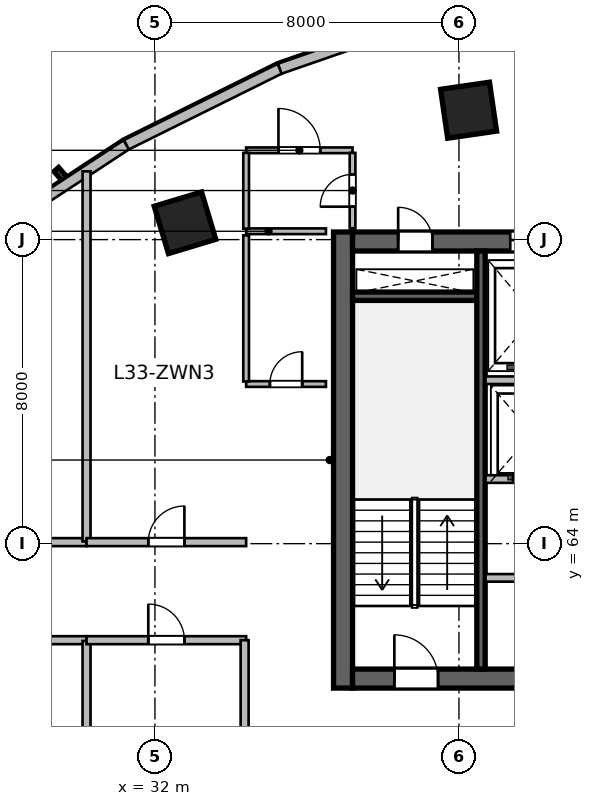
"""IFC4 building model, lengths in metres.
Left out: names, types, materials, properties, quantities, classifications, styles, units other than length and angle.
Written with IfcOpenShell. Run it as: python <this file> out.ifc"""

import sys

from ifc_helpers import new_model, si_unit, direction, frame, frame_2d, origin, origin_2d, place, context, subcontext, project, spatial, rectangle, extrude, source, transform, mapped, element, fill, save


model = new_model("IFC4")
c1 = context("Model", 3, precision=1e-05, world=origin(), true_north=direction((0.0, 1.0)))
c2 = subcontext(c1, "Body", "Model", "MODEL_VIEW")
j1 = project(units=[si_unit("LENGTHUNIT", "METRE"), si_unit("PLANEANGLEUNIT", "RADIAN")], contexts=[c1])
p1 = place(None, origin())
s1 = spatial("IfcSite", under=j1, at=p1, CompositionType="ELEMENT")
p2 = place(p1, origin())
s2 = spatial("IfcBuilding", under=s1, at=p2, CompositionType="ELEMENT")
p3 = place(p2, frame((0.0, 0.0, 138.9)))
s3 = spatial("IfcBuildingStorey", under=s2, at=p3, CompositionType="ELEMENT", Elevation=138.9)
m1 = source(origin(), c2, "Body", "SweptSolid", [
    extrude(rectangle(XDim=12.0, YDim=0.5, at=frame_2d((6.0, 0.0))), origin(), (0.0, 0.0, 1.0), 3.9),
])
p4 = place(p3, frame((36.95, 60.2, 0.0), z_axis=(0.0, 0.0, 1.0), x_axis=(0.0, 1.0, 0.0)))
e1 = element("IfcWall", 1, at=p4, inside=s3, PredefinedType="SHEAR", context=c2, shape_type="MappedRepresentation", body=[
    mapped(m1, transform((0.0, 0.0, 0.0), scale=1.0)),
])
m2 = source(origin(), c2, "Body", "SweptSolid", [
    extrude(rectangle(XDim=21.6, YDim=0.5, at=frame_2d((10.8, 0.0))), origin(), (0.0, 0.0, 1.0), 3.9),
])
p5 = place(p3, frame((37.2, 60.45, 0.0), z_axis=(0.0, 0.0, 1.0), x_axis=(1.0, 0.0, 0.0)))
e2 = element("IfcWall", 2, at=p5, inside=s3, PredefinedType="SHEAR", context=c2, shape_type="MappedRepresentation", body=[
    mapped(m2, transform((0.0, 0.0, 0.0), scale=1.0)),
])
p6 = place(p5, frame((1.1, 0.0, 0.0)))
e3 = element("IfcOpeningElement", 3, at=p6, cuts=e2, PredefinedType="OPENING", context=c2, shape_type="SweptSolid", body=[
    extrude(rectangle(XDim=1.15, YDim=2.15, at=frame_2d((0.575, 1.075))), frame((0.0, 0.26, 0.0), z_axis=(0.0, -1.0, 0.0), x_axis=(1.0, 0.0, 0.0)), (0.0, 0.0, 1.0), 0.52),
])
p7 = place(p5, frame((19.5, 0.0, 0.0)))
e4 = element("IfcOpeningElement", 4, at=p7, cuts=e2, PredefinedType="OPENING", context=c2, shape_type="SweptSolid", body=[
    extrude(rectangle(XDim=0.9, YDim=2.1, at=frame_2d((0.45, 1.05))), frame((0.0, 0.26, 0.0), z_axis=(0.0, -1.0, 0.0), x_axis=(1.0, 0.0, 0.0)), (0.0, 0.0, 1.0), 0.52),
])
p8 = place(p5, frame((12.02, 0.0, 0.0)))
e5 = element("IfcOpeningElement", 5, at=p8, cuts=e2, PredefinedType="OPENING", context=c2, shape_type="SweptSolid", body=[
    extrude(rectangle(XDim=1.6, YDim=2.15, at=frame_2d((0.8, 1.075))), frame((0.0, 0.26, 0.0), z_axis=(0.0, -1.0, 0.0), x_axis=(1.0, 0.0, 0.0)), (0.0, 0.0, 1.0), 0.52),
])
p9 = place(p3, frame((37.2, 71.95, 0.0), z_axis=(0.0, 0.0, 1.0), x_axis=(1.0, 0.0, 0.0)))
e6 = element("IfcWall", 6, at=p9, inside=s3, PredefinedType="SHEAR", context=c2, shape_type="MappedRepresentation", body=[
    mapped(m2, transform((0.0, 0.0, 0.0), scale=1.0)),
])
p10 = place(p9, frame((1.2, 0.0, 0.0)))
e7 = element("IfcOpeningElement", 7, at=p10, cuts=e6, PredefinedType="OPENING", context=c2, shape_type="SweptSolid", body=[
    extrude(rectangle(XDim=0.9, YDim=2.1, at=frame_2d((0.45, 1.05))), frame((0.0, 0.26, 0.0), z_axis=(0.0, -1.0, 0.0), x_axis=(1.0, 0.0, 0.0)), (0.0, 0.0, 1.0), 0.52),
])
p11 = place(p9, frame((14.7, 0.0, 0.0)))
e8 = element("IfcOpeningElement", 8, at=p11, cuts=e6, PredefinedType="OPENING", context=c2, shape_type="SweptSolid", body=[
    extrude(rectangle(XDim=1.2, YDim=2.15, at=frame_2d((0.6, 1.075))), frame((0.0, 0.26, 0.0), z_axis=(0.0, -1.0, 0.0), x_axis=(1.0, 0.0, 0.0)), (0.0, 0.0, 1.0), 0.52),
])
p12 = place(p9, frame((4.15, 0.0, 0.0)))
e9 = element("IfcOpeningElement", 9, at=p12, cuts=e6, PredefinedType="OPENING", context=c2, shape_type="SweptSolid", body=[
    extrude(rectangle(XDim=1.3, YDim=2.15, at=frame_2d((0.65, 1.075))), frame((0.0, 0.26, 0.0), z_axis=(0.0, -1.0, 0.0), x_axis=(1.0, 0.0, 0.0)), (0.0, 0.0, 1.0), 0.52),
])
p13 = place(p9, frame((7.25, 0.0, 0.0)))
e10 = element("IfcOpeningElement", 10, at=p13, cuts=e6, PredefinedType="OPENING", context=c2, shape_type="SweptSolid", body=[
    extrude(rectangle(XDim=0.9, YDim=2.1, at=frame_2d((0.45, 1.05))), frame((0.0, 0.26, 0.0), z_axis=(0.0, -1.0, 0.0), x_axis=(1.0, 0.0, 0.0)), (0.0, 0.0, 1.0), 0.52),
])
p14 = place(p9, frame((10.95, 0.0, 0.0)))
e11 = element("IfcOpeningElement", 11, at=p14, cuts=e6, PredefinedType="OPENING", context=c2, shape_type="SweptSolid", body=[
    extrude(rectangle(XDim=0.9, YDim=2.1, at=frame_2d((0.45, 1.05))), frame((0.0, 0.26, 0.0), z_axis=(0.0, -1.0, 0.0), x_axis=(1.0, 0.0, 0.0)), (0.0, 0.0, 1.0), 0.52),
])
m3 = source(origin(), c2, "Body", "SweptSolid", [
    extrude(rectangle(XDim=3.27, YDim=0.22, at=frame_2d((1.635, 0.0))), origin(), (0.0, 0.0, 1.0), 3.9),
])
p15 = place(p3, frame((37.2, 70.51, 0.0), z_axis=(0.0, 0.0, 1.0), x_axis=(1.0, 0.0, 0.0)))
e12 = element("IfcWall", 12, at=p15, inside=s3, PredefinedType="SHEAR", context=c2, shape_type="MappedRepresentation", body=[
    mapped(m3, transform((0.0, 0.0, 0.0), scale=1.0)),
])
m4 = source(origin(), c2, "Body", "SweptSolid", [
    extrude(rectangle(XDim=11.0, YDim=0.22, at=frame_2d((5.5, 0.0))), origin(), (0.0, 0.0, 1.0), 3.9),
])
p16 = place(p3, frame((40.58, 60.7, 0.0), z_axis=(0.0, 0.0, 1.0), x_axis=(0.0, 1.0, 0.0)))
e13 = element("IfcWall", 13, at=p16, inside=s3, PredefinedType="SHEAR", context=c2, shape_type="MappedRepresentation", body=[
    mapped(m4, transform((0.0, 0.0, 0.0), scale=1.0)),
])
m5 = source(origin(), c2, "Body", "SweptSolid", [
    extrude(rectangle(XDim=1.3, YDim=1.3, at=origin_2d()), origin(), (0.0, 0.0, 1.0), 3.9),
])
for number, where, z_axis, x_axis in (
    (14, (32.791, 72.442, 0.0), (0.0, 0.0, 1.0), (-0.289, 0.957, 0.0)),
    (15, (40.253, 75.404, 0.0), (0.0, 0.0, 1.0), (-0.143, 0.99, 0.0)),
):
    element("IfcColumn", number, at=place(p3, frame(where, z_axis=z_axis, x_axis=x_axis)), inside=s3, PredefinedType="COLUMN", context=c2, shape_type="MappedRepresentation", body=[
        mapped(m5, transform((0.0, 0.0, 0.0), scale=1.0)),
    ])
m6 = source(origin(), c2, "Body", "SweptSolid", [
    extrude(rectangle(XDim=4.626, YDim=0.28, at=frame_2d((2.313, 0.0))), origin(), (0.0, 0.0, 1.0), 3.65),
])
p17 = place(p3, frame((27.382, 71.958, 0.0), z_axis=(0.0, 0.0, 1.0), x_axis=(0.83595938331, 0.548791316855, 0.0)))
e16 = element("IfcWall", 16, at=p17, inside=s3, PredefinedType="SOLIDWALL", context=c2, shape_type="MappedRepresentation", body=[
    mapped(m6, transform((0.0, 0.0, 0.0), scale=1.0)),
])
m7 = source(origin(), c2, "Body", "SweptSolid", [
    extrude(rectangle(XDim=4.506, YDim=0.28, at=frame_2d((2.253, 0.0))), origin(), (0.0, 0.0, 1.0), 3.65),
])
p18 = place(p3, frame((31.249, 74.496, 0.0), z_axis=(0.0, 0.0, 1.0), x_axis=(0.89597155075, 0.444111450254, 0.0)))
e17 = element("IfcWall", 17, at=p18, inside=s3, PredefinedType="SOLIDWALL", context=c2, shape_type="MappedRepresentation", body=[
    mapped(m7, transform((0.0, 0.0, 0.0), scale=1.0)),
])
m8 = source(origin(), c2, "Body", "SweptSolid", [
    extrude(rectangle(XDim=4.409, YDim=0.28, at=frame_2d((2.205, 0.0))), origin(), (0.0, 0.0, 1.0), 3.65),
])
p19 = place(p3, frame((35.286, 76.497, 0.0), z_axis=(0.0, 0.0, 1.0), x_axis=(0.944879374121, 0.327418643881, 0.0)))
e18 = element("IfcWall", 18, at=p19, inside=s3, PredefinedType="SOLIDWALL", context=c2, shape_type="MappedRepresentation", body=[
    mapped(m8, transform((0.0, 0.0, 0.0), scale=1.0)),
])
m9 = source(origin(), c2, "Body", "SweptSolid", [
    extrude(rectangle(XDim=8.8, YDim=0.2, at=frame_2d((4.4, 0.0))), origin(), (0.0, 0.0, 1.0), 3.65),
])
p20 = place(p3, frame((40.7, 68.3, 0.0), z_axis=(0.0, 0.0, 1.0), x_axis=(1.0, 0.0, 0.0)))
e19 = element("IfcWall", 19, at=p20, inside=s3, PredefinedType="SOLIDWALL", context=c2, shape_type="MappedRepresentation", body=[
    mapped(m9, transform((0.0, 0.0, 0.0), scale=1.0)),
])
m10 = source(origin(), c2, "Body", "SweptSolid", [
    extrude(rectangle(XDim=8.02, YDim=0.2, at=frame_2d((4.01, 0.0))), origin(), (0.0, 0.0, 1.0), 3.65),
])
p21 = place(p3, frame((40.7, 63.1, 0.0), z_axis=(0.0, 0.0, 1.0), x_axis=(1.0, 0.0, 0.0)))
e20 = element("IfcWall", 20, at=p21, inside=s3, PredefinedType="SOLIDWALL", context=c2, shape_type="MappedRepresentation", body=[
    mapped(m10, transform((0.0, 0.0, 0.0), scale=1.0)),
])
p22 = place(p21, frame((1.05, 0.0, 0.0)))
e21 = element("IfcOpeningElement", 21, at=p22, cuts=e20, PredefinedType="OPENING", context=c2, shape_type="SweptSolid", body=[
    extrude(rectangle(XDim=0.9, YDim=2.1, at=frame_2d((0.45, 1.05))), frame((0.0, 0.11, 0.0), z_axis=(0.0, -1.0, 0.0), x_axis=(1.0, 0.0, 0.0)), (0.0, 0.0, 1.0), 0.22),
])
p23 = place(p21, frame((4.99, 0.0, 0.0)))
e22 = element("IfcOpeningElement", 22, at=p23, cuts=e20, PredefinedType="OPENING", context=c2, shape_type="SweptSolid", body=[
    extrude(rectangle(XDim=0.9, YDim=2.1, at=frame_2d((0.45, 1.05))), frame((0.0, 0.11, 0.0), z_axis=(0.0, -1.0, 0.0), x_axis=(1.0, 0.0, 0.0)), (0.0, 0.0, 1.0), 0.22),
])
p24 = place(p3, frame((40.7, 65.7, 0.0), z_axis=(0.0, 0.0, 1.0), x_axis=(1.0, 0.0, 0.0)))
e23 = element("IfcWall", 23, at=p24, inside=s3, PredefinedType="SOLIDWALL", context=c2, shape_type="MappedRepresentation", body=[
    mapped(m9, transform((0.0, 0.0, 0.0), scale=1.0)),
])
p25 = place(p24, frame((0.72, 0.0, 0.0)))
e24 = element("IfcOpeningElement", 24, at=p25, cuts=e23, PredefinedType="OPENING", context=c2, shape_type="SweptSolid", body=[
    extrude(rectangle(XDim=1.0, YDim=2.15, at=frame_2d((0.5, 1.075))), frame((0.0, 0.11, 0.0), z_axis=(0.0, -1.0, 0.0), x_axis=(1.0, 0.0, 0.0)), (0.0, 0.0, 1.0), 0.22),
])
p26 = place(p24, frame((2.62, 0.0, 0.0)))
e25 = element("IfcOpeningElement", 25, at=p26, cuts=e23, PredefinedType="OPENING", context=c2, shape_type="SweptSolid", body=[
    extrude(rectangle(XDim=1.0, YDim=2.15, at=frame_2d((0.5, 1.075))), frame((0.0, 0.11, 0.0), z_axis=(0.0, -1.0, 0.0), x_axis=(1.0, 0.0, 0.0)), (0.0, 0.0, 1.0), 0.22),
])
p27 = place(p24, frame((4.55, 0.0, 0.0)))
e26 = element("IfcOpeningElement", 26, at=p27, cuts=e23, PredefinedType="OPENING", context=c2, shape_type="SweptSolid", body=[
    extrude(rectangle(XDim=1.0, YDim=2.15, at=frame_2d((0.5, 1.075))), frame((0.0, 0.11, 0.0), z_axis=(0.0, -1.0, 0.0), x_axis=(1.0, 0.0, 0.0)), (0.0, 0.0, 1.0), 0.22),
])
p28 = place(p24, frame((6.55, 0.0, 0.0)))
e27 = element("IfcOpeningElement", 27, at=p28, cuts=e23, PredefinedType="OPENING", context=c2, shape_type="SweptSolid", body=[
    extrude(rectangle(XDim=1.0, YDim=2.15, at=frame_2d((0.5, 1.075))), frame((0.0, 0.11, 0.0), z_axis=(0.0, -1.0, 0.0), x_axis=(1.0, 0.0, 0.0)), (0.0, 0.0, 1.0), 0.22),
])
m11 = source(origin(), c2, "Body", "SweptSolid", [
    extrude(rectangle(XDim=2.1, YDim=0.15, at=frame_2d((1.05, 0.0))), origin(), (0.0, 0.0, 1.0), 3.65),
])
p29 = place(p3, frame((34.4, 72.22, 0.0), z_axis=(0.0, 0.0, 1.0), x_axis=(1.0, 0.0, 0.0)))
e28 = element("IfcWall", 28, at=p29, inside=s3, PredefinedType="PARTITIONING", context=c2, shape_type="MappedRepresentation", body=[
    mapped(m11, transform((0.0, 0.0, 0.0), scale=1.0)),
])
m12 = source(origin(), c2, "Body", "SweptSolid", [
    extrude(rectangle(XDim=2.8, YDim=0.15, at=frame_2d((1.4, 0.0))), origin(), (0.0, 0.0, 1.0), 3.65),
])
p30 = place(p3, frame((34.4, 74.35, 0.0), z_axis=(0.0, 0.0, 1.0), x_axis=(1.0, 0.0, 0.0)))
e29 = element("IfcWall", 29, at=p30, inside=s3, PredefinedType="PARTITIONING", context=c2, shape_type="MappedRepresentation", body=[
    mapped(m12, transform((0.0, 0.0, 0.0), scale=1.0)),
])
p31 = place(p30, frame((0.85, 0.0, 0.0)))
e30 = element("IfcOpeningElement", 30, at=p31, cuts=e29, PredefinedType="OPENING", context=c2, shape_type="SweptSolid", body=[
    extrude(rectangle(XDim=1.1, YDim=2.15, at=frame_2d((0.55, 1.075))), frame((0.0, 0.085, 0.0), z_axis=(0.0, -1.0, 0.0), x_axis=(1.0, 0.0, 0.0)), (0.0, 0.0, 1.0), 0.17),
])
m13 = source(origin(), c2, "Body", "SweptSolid", [
    extrude(rectangle(XDim=1.995, YDim=0.15, at=frame_2d((0.998, 0.0))), origin(), (0.0, 0.0, 1.0), 3.65),
])
p32 = place(p3, frame((34.4, 72.288, 0.0), z_axis=(0.0, 0.0, 1.0), x_axis=(0.0, 1.0, 0.0)))
e31 = element("IfcWall", 31, at=p32, inside=s3, PredefinedType="PARTITIONING", context=c2, shape_type="MappedRepresentation", body=[
    mapped(m13, transform((0.0, 0.0, 0.0), scale=1.0)),
])
m14 = source(origin(), c2, "Body", "SweptSolid", [
    extrude(rectangle(XDim=1.982, YDim=0.15, at=frame_2d((0.991, 0.0))), origin(), (0.0, 0.0, 1.0), 3.65),
])
p33 = place(p3, frame((37.2, 72.3, 0.0), z_axis=(0.0, 0.0, 1.0), x_axis=(0.0, 1.0, 0.0)))
e32 = element("IfcWall", 32, at=p33, inside=s3, PredefinedType="PARTITIONING", context=c2, shape_type="MappedRepresentation", body=[
    mapped(m14, transform((0.0, 0.0, 0.0), scale=1.0)),
])
p34 = place(p33, frame((0.566, 0.0, 0.0)))
e33 = element("IfcOpeningElement", 33, at=p34, cuts=e32, PredefinedType="OPENING", context=c2, shape_type="SweptSolid", body=[
    extrude(rectangle(XDim=0.85, YDim=2.1, at=frame_2d((0.425, 1.05))), frame((0.0, 0.085, 0.0), z_axis=(0.0, -1.0, 0.0), x_axis=(1.0, 0.0, 0.0)), (0.0, 0.0, 1.0), 0.17),
])
p35 = place(p3, frame((34.4, 68.2, 0.0), z_axis=(0.0, 0.0, 1.0), x_axis=(1.0, 0.0, 0.0)))
e34 = element("IfcWall", 34, at=p35, inside=s3, PredefinedType="PARTITIONING", context=c2, shape_type="MappedRepresentation", body=[
    mapped(m11, transform((0.0, 0.0, 0.0), scale=1.0)),
])
p36 = place(p35, frame((0.625, 0.0, 0.0)))
e35 = element("IfcOpeningElement", 35, at=p36, cuts=e34, PredefinedType="OPENING", context=c2, shape_type="SweptSolid", body=[
    extrude(rectangle(XDim=0.85, YDim=2.1, at=frame_2d((0.425, 1.05))), frame((0.0, 0.085, 0.0), z_axis=(0.0, -1.0, 0.0), x_axis=(1.0, 0.0, 0.0)), (0.0, 0.0, 1.0), 0.17),
])
m15 = source(origin(), c2, "Body", "SweptSolid", [
    extrude(rectangle(XDim=3.845, YDim=0.15, at=frame_2d((1.922, 0.0))), origin(), (0.0, 0.0, 1.0), 3.65),
])
p37 = place(p3, frame((34.4, 68.268, 0.0), z_axis=(0.0, 0.0, 1.0), x_axis=(0.0, 1.0, 0.0)))
e36 = element("IfcWall", 36, at=p37, inside=s3, PredefinedType="PARTITIONING", context=c2, shape_type="MappedRepresentation", body=[
    mapped(m15, transform((0.0, 0.0, 0.0), scale=1.0)),
])
m16 = source(origin(), c2, "Body", "SweptSolid", [
    extrude(rectangle(XDim=4.0, YDim=0.21, at=frame_2d((2.0, 0.0))), origin(), (0.0, 0.0, 1.0), 3.65),
])
p38 = place(p3, frame((26.2, 64.04, 0.0), z_axis=(0.0, 0.0, 1.0), x_axis=(1.0, 0.0, 0.0)))
e37 = element("IfcWall", 37, at=p38, inside=s3, PredefinedType="PARTITIONING", context=c2, shape_type="MappedRepresentation", body=[
    mapped(m16, transform((0.0, 0.0, 0.0), scale=1.0)),
])
p39 = place(p38, frame((1.525, 0.0, 0.0)))
e38 = element("IfcOpeningElement", 38, at=p39, cuts=e37, PredefinedType="OPENING", context=c2, shape_type="SweptSolid", body=[
    extrude(rectangle(XDim=0.95, YDim=2.1, at=frame_2d((0.475, 1.05))), frame((0.0, 0.115, 0.0), z_axis=(0.0, -1.0, 0.0), x_axis=(1.0, 0.0, 0.0)), (0.0, 0.0, 1.0), 0.23),
])
m17 = source(origin(), c2, "Body", "SweptSolid", [
    extrude(rectangle(XDim=9.736, YDim=0.21, at=frame_2d((4.868, 0.0))), origin(), (0.0, 0.0, 1.0), 3.65),
])
p40 = place(p3, frame((30.2, 64.06, 0.0), z_axis=(0.0, 0.0, 1.0), x_axis=(0.0, 1.0, 0.0)))
e39 = element("IfcWall", 39, at=p40, inside=s3, PredefinedType="PARTITIONING", context=c2, shape_type="MappedRepresentation", body=[
    mapped(m17, transform((0.0, 0.0, 0.0), scale=1.0)),
])
m18 = source(origin(), c2, "Body", "SweptSolid", [
    extrude(rectangle(XDim=4.2, YDim=0.21, at=frame_2d((2.1, 0.0))), origin(), (0.0, 0.0, 1.0), 3.65),
])
p41 = place(p3, frame((30.2, 64.04, 0.0), z_axis=(0.0, 0.0, 1.0), x_axis=(1.0, 0.0, 0.0)))
e40 = element("IfcWall", 40, at=p41, inside=s3, PredefinedType="PARTITIONING", context=c2, shape_type="MappedRepresentation", body=[
    mapped(m18, transform((0.0, 0.0, 0.0), scale=1.0)),
])
p42 = place(p41, frame((1.625, 0.0, 0.0)))
e41 = element("IfcOpeningElement", 41, at=p42, cuts=e40, PredefinedType="OPENING", context=c2, shape_type="SweptSolid", body=[
    extrude(rectangle(XDim=0.95, YDim=2.1, at=frame_2d((0.475, 1.05))), frame((0.0, 0.115, 0.0), z_axis=(0.0, -1.0, 0.0), x_axis=(1.0, 0.0, 0.0)), (0.0, 0.0, 1.0), 0.23),
])
p43 = place(p3, frame((26.2, 61.46, 0.0), z_axis=(0.0, 0.0, 1.0), x_axis=(1.0, 0.0, 0.0)))
e42 = element("IfcWall", 42, at=p43, inside=s3, PredefinedType="PARTITIONING", context=c2, shape_type="MappedRepresentation", body=[
    mapped(m16, transform((0.0, 0.0, 0.0), scale=1.0)),
])
p44 = place(p43, frame((1.525, 0.0, 0.0)))
e43 = element("IfcOpeningElement", 43, at=p44, cuts=e42, PredefinedType="OPENING", context=c2, shape_type="SweptSolid", body=[
    extrude(rectangle(XDim=0.95, YDim=2.1, at=frame_2d((0.475, 1.05))), frame((0.0, 0.115, 0.0), z_axis=(0.0, -1.0, 0.0), x_axis=(1.0, 0.0, 0.0)), (0.0, 0.0, 1.0), 0.23),
])
m19 = source(origin(), c2, "Body", "SweptSolid", [
    extrude(rectangle(XDim=19.103, YDim=0.21, at=frame_2d((9.552, 0.0))), origin(), (0.0, 0.0, 1.0), 2.942),
])
p45 = place(p3, frame((30.2, 42.337, 0.0), z_axis=(0.0, 0.0, 1.0), x_axis=(0.0, 1.0, 0.0)))
e44 = element("IfcWall", 44, at=p45, inside=s3, PredefinedType="PARTITIONING", context=c2, shape_type="MappedRepresentation", body=[
    mapped(m19, transform((0.0, 0.0, 0.0), scale=1.0)),
])
p46 = place(p3, frame((30.2, 61.46, 0.0), z_axis=(0.0, 0.0, 1.0), x_axis=(1.0, 0.0, 0.0)))
e45 = element("IfcWall", 45, at=p46, inside=s3, PredefinedType="PARTITIONING", context=c2, shape_type="MappedRepresentation", body=[
    mapped(m18, transform((0.0, 0.0, 0.0), scale=1.0)),
])
p47 = place(p46, frame((1.625, 0.0, 0.0)))
e46 = element("IfcOpeningElement", 46, at=p47, cuts=e45, PredefinedType="OPENING", context=c2, shape_type="SweptSolid", body=[
    extrude(rectangle(XDim=0.95, YDim=2.1, at=frame_2d((0.475, 1.05))), frame((0.0, 0.115, 0.0), z_axis=(0.0, -1.0, 0.0), x_axis=(1.0, 0.0, 0.0)), (0.0, 0.0, 1.0), 0.23),
])
m20 = source(origin(), c2, "Body", "SweptSolid", [
    extrude(rectangle(XDim=13.988, YDim=0.21, at=frame_2d((6.994, 0.0))), origin(), (0.0, 0.0, 1.0), 3.65),
])
p48 = place(p3, frame((34.36, 47.472, 0.0), z_axis=(0.0, 0.0, 1.0), x_axis=(0.0, 1.0, 0.0)))
e47 = element("IfcWall", 47, at=p48, inside=s3, PredefinedType="PARTITIONING", context=c2, shape_type="MappedRepresentation", body=[
    mapped(m20, transform((0.0, 0.0, 0.0), scale=1.0)),
])
m21 = source(origin(), c2, "Body", "SweptSolid", [
    extrude(rectangle(XDim=1.15, YDim=2.15, at=frame_2d((0.575, 1.075))), frame((0.0, 0.025, 0.0), z_axis=(0.0, -1.0, 0.0), x_axis=(1.0, 0.0, 0.0)), (0.0, 0.0, 1.0), 0.05),
])
p49 = place(p6, origin())
e48 = element("IfcDoor", 48, at=p49, inside=s3, OperationType="SINGLE_SWING_LEFT", PredefinedType="DOOR", context=c2, shape_type="MappedRepresentation", body=[
    mapped(m21, transform((0.0, 0.0, 0.0), scale=1.0)),
])
fill(e3, e48)
m22 = source(origin(), c2, "Body", "SweptSolid", [
    extrude(rectangle(XDim=0.9, YDim=2.1, at=frame_2d((0.45, 1.05))), frame((0.0, 0.025, 0.0), z_axis=(0.0, -1.0, 0.0), x_axis=(1.0, 0.0, 0.0)), (0.0, 0.0, 1.0), 0.05),
])
p50 = place(p10, origin())
e49 = element("IfcDoor", 49, at=p50, inside=s3, OperationType="SINGLE_SWING_LEFT", PredefinedType="DOOR", context=c2, shape_type="MappedRepresentation", body=[
    mapped(m22, transform((0.0, 0.0, 0.0), scale=1.0)),
])
fill(e7, e49)
m23 = source(origin(), c2, "Body", "SweptSolid", [
    extrude(rectangle(XDim=1.3, YDim=2.15, at=frame_2d((0.65, 1.075))), frame((0.0, 0.025, 0.0), z_axis=(0.0, -1.0, 0.0), x_axis=(1.0, 0.0, 0.0)), (0.0, 0.0, 1.0), 0.05),
])
p51 = place(p12, origin())
e50 = element("IfcDoor", 50, at=p51, inside=s3, OperationType="DOUBLE_DOOR_SLIDING", PredefinedType="DOOR", context=c2, shape_type="MappedRepresentation", body=[
    mapped(m23, transform((0.0, 0.0, 0.0), scale=1.0)),
])
fill(e9, e50)
m24 = source(origin(), c2, "Body", "SweptSolid", [
    extrude(rectangle(XDim=1.0, YDim=2.15, at=frame_2d((0.5, 1.075))), frame((0.0, 0.025, 0.0), z_axis=(0.0, -1.0, 0.0), x_axis=(1.0, 0.0, 0.0)), (0.0, 0.0, 1.0), 0.05),
])
p52 = place(p25, origin())
e51 = element("IfcDoor", 51, at=p52, inside=s3, OperationType="DOUBLE_DOOR_SLIDING", PredefinedType="DOOR", context=c2, shape_type="MappedRepresentation", body=[
    mapped(m24, transform((0.0, 0.0, 0.0), scale=1.0)),
])
fill(e24, e51)
m25 = source(origin(), c2, "Body", "SweptSolid", [
    extrude(rectangle(XDim=0.85, YDim=2.1, at=frame_2d((0.425, 1.05))), frame((0.0, 0.025, 0.0), z_axis=(0.0, -1.0, 0.0), x_axis=(1.0, 0.0, 0.0)), (0.0, 0.0, 1.0), 0.05),
])
p53 = place(p34, origin())
e52 = element("IfcDoor", 52, at=p53, inside=s3, OperationType="SINGLE_SWING_LEFT", PredefinedType="DOOR", context=c2, shape_type="MappedRepresentation", body=[
    mapped(m25, transform((0.0, 0.0, 0.0), scale=1.0)),
])
fill(e33, e52)
p54 = place(p36, origin())
e53 = element("IfcDoor", 53, at=p54, inside=s3, OperationType="SINGLE_SWING_RIGHT", PredefinedType="DOOR", context=c2, shape_type="MappedRepresentation", body=[
    mapped(m25, transform((0.0, 0.0, 0.0), scale=1.0)),
])
fill(e35, e53)
m26 = source(origin(), c2, "Body", "SweptSolid", [
    extrude(rectangle(XDim=1.1, YDim=2.15, at=frame_2d((0.55, 1.075))), frame((0.0, 0.025, 0.0), z_axis=(0.0, -1.0, 0.0), x_axis=(1.0, 0.0, 0.0)), (0.0, 0.0, 1.0), 0.05),
])
p55 = place(p31, origin())
e54 = element("IfcDoor", 54, at=p55, inside=s3, OperationType="SINGLE_SWING_LEFT", PredefinedType="DOOR", context=c2, shape_type="MappedRepresentation", body=[
    mapped(m26, transform((0.0, 0.0, 0.0), scale=1.0)),
])
fill(e30, e54)
m27 = source(origin(), c2, "Body", "SweptSolid", [
    extrude(rectangle(XDim=0.95, YDim=2.1, at=frame_2d((0.475, 1.05))), frame((0.0, 0.025, 0.0), z_axis=(0.0, -1.0, 0.0), x_axis=(1.0, 0.0, 0.0)), (0.0, 0.0, 1.0), 0.05),
])
p56 = place(p42, origin())
e55 = element("IfcDoor", 55, at=p56, inside=s3, OperationType="SINGLE_SWING_RIGHT", PredefinedType="DOOR", context=c2, shape_type="MappedRepresentation", body=[
    mapped(m27, transform((0.0, 0.0, 0.0), scale=1.0)),
])
fill(e41, e55)
p57 = place(p47, origin())
e56 = element("IfcDoor", 56, at=p57, inside=s3, OperationType="SINGLE_SWING_LEFT", PredefinedType="DOOR", context=c2, shape_type="MappedRepresentation", body=[
    mapped(m27, transform((0.0, 0.0, 0.0), scale=1.0)),
])
fill(e46, e56)
save(model, sys.argv[1])
